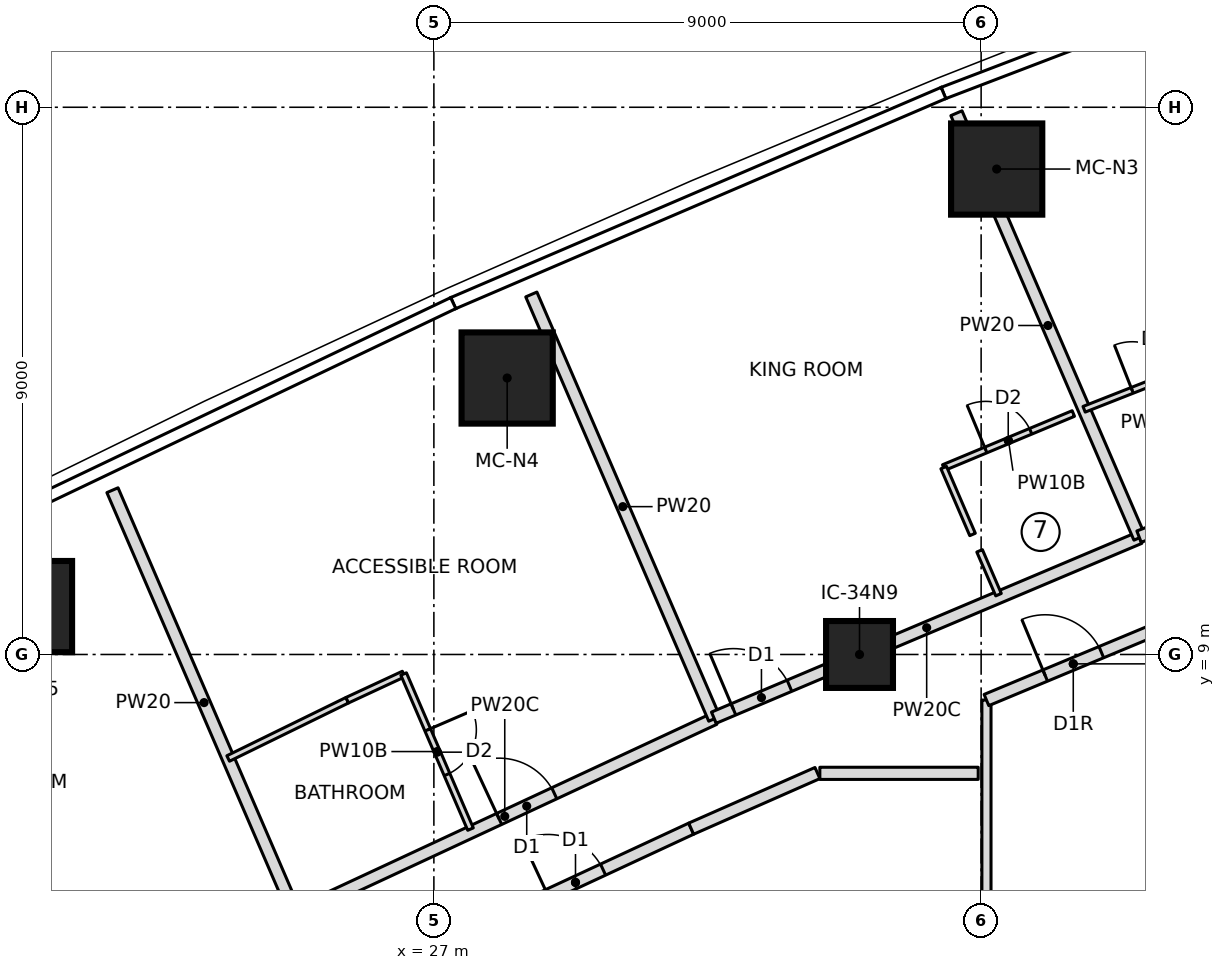
"""IFC4 building model, lengths in metres.
Left out: names, types, materials, properties, quantities, classifications, styles, units other than length and angle.
Written with IfcOpenShell. Run it as: python <this file> out.ifc"""

import sys

from ifc_helpers import new_model, si_unit, direction, frame, frame_2d, origin, origin_2d, place, context, subcontext, project, spatial, rectangle, extrude, element, fill, save


model = new_model("IFC4")
c1 = context("Model", 3, precision=1e-05, world=origin(), true_north=direction((0.0, 1.0)))
c2 = subcontext(c1, "Body", "Model", "MODEL_VIEW")
j1 = project(units=[si_unit("LENGTHUNIT", "METRE"), si_unit("PLANEANGLEUNIT", "RADIAN")], contexts=[c1])
p1 = place(None, origin())
s1 = spatial("IfcSite", under=j1, at=p1, CompositionType="ELEMENT")
p2 = place(p1, origin())
s2 = spatial("IfcBuilding", under=s1, at=p2, CompositionType="ELEMENT")
p3 = place(p2, frame((0.0, 0.0, 158.6)))
s3 = spatial("IfcBuildingStorey", under=s2, at=p3, CompositionType="ELEMENT", Elevation=158.6)
for number, where, z_axis, x_axis in (
    (1, (36.256, 16.984, 0.0), (0.0, 0.0, 1.0), (1.0, 0.0, 0.0)),
    (2, (28.205, 13.547, 0.0), (0.0, 0.0, 1.0), (1.0, 0.0, 0.0)),
    (3, (20.3, 9.788, 0.0), (0.0, 0.0, 1.0), (1.0, 0.0, 0.0)),
):
    element("IfcColumn", number, at=place(p3, frame(where, z_axis=z_axis, x_axis=x_axis)), inside=s3, PredefinedType="COLUMN", context=c2, shape_type="SweptSolid", body=[
        extrude(rectangle(XDim=1.5, YDim=1.5, at=origin_2d()), origin(), (0.0, 0.0, 1.0), 3.55),
    ])
p4 = place(p3, frame((34.0, 9.0, 0.0), z_axis=(0.0, 0.0, 1.0), x_axis=(1.0, 0.0, 0.0)))
e4 = element("IfcColumn", 4, at=p4, inside=s3, PredefinedType="COLUMN", context=c2, shape_type="SweptSolid", body=[
    extrude(rectangle(XDim=1.1, YDim=1.1, at=origin_2d()), origin(), (0.0, 0.0, 1.0), 3.55),
])
p5 = place(p3, frame((24.727, 4.715, 0.0), z_axis=(0.0, 0.0, 1.0), x_axis=(-0.395982367396, 0.918258114427, 0.0)))
e5 = element("IfcWall", 5, at=p5, inside=s3, PredefinedType="PARTITIONING", context=c2, shape_type="SweptSolid", body=[
    extrude(rectangle(XDim=7.609, YDim=0.2, at=frame_2d((3.804, 0.0))), origin(), (0.0, 0.0, 1.0), 3.25),
])
p6 = place(p3, frame((24.719, 4.733, 0.0), z_axis=(0.0, 0.0, 1.0), x_axis=(0.906593711122, 0.422004553238, 0.0)))
e6 = element("IfcWall", 6, at=p6, inside=s3, PredefinedType="PARTITIONING", context=c2, shape_type="SweptSolid", body=[
    extrude(rectangle(XDim=7.603, YDim=0.2, at=frame_2d((3.802, 0.0))), origin(), (0.0, 0.0, 1.0), 3.25),
])
p7 = place(p6, frame((3.7, 0.0, 0.0)))
e7 = element("IfcOpeningElement", 7, at=p7, cuts=e6, PredefinedType="OPENING", context=c2, shape_type="SweptSolid", body=[
    extrude(rectangle(XDim=1.0, YDim=2.1, at=frame_2d((0.5, 1.05))), frame((0.0, 0.11, 0.0), z_axis=(0.0, -1.0, 0.0), x_axis=(1.0, 0.0, 0.0)), (0.0, 0.0, 1.0), 0.22),
])
p8 = place(p3, frame((23.617, 7.289, 0.0), z_axis=(0.0, 0.0, 1.0), x_axis=(0.898158387811, 0.439672048696, 0.0)))
e8 = element("IfcWall", 8, at=p8, inside=s3, PredefinedType="PARTITIONING", context=c2, shape_type="SweptSolid", body=[
    extrude(rectangle(XDim=2.18, YDim=0.1, at=frame_2d((1.09, 0.0))), origin(), (0.0, 0.0, 1.0), 3.25),
])
p9 = place(p3, frame((25.575, 8.248, 0.0), z_axis=(0.0, 0.0, 1.0), x_axis=(0.906901476145, 0.421342749512, 0.0)))
e9 = element("IfcWall", 9, at=p9, inside=s3, PredefinedType="PARTITIONING", context=c2, shape_type="SweptSolid", body=[
    extrude(rectangle(XDim=1.023, YDim=0.1, at=frame_2d((0.511, 0.0))), origin(), (0.0, 0.0, 1.0), 3.25),
])
p10 = place(p3, frame((26.503, 8.679, 0.0), z_axis=(0.0, 0.0, 1.0), x_axis=(0.396018464604, -0.918242547311, 0.0)))
e10 = element("IfcWall", 10, at=p10, inside=s3, PredefinedType="PARTITIONING", context=c2, shape_type="SweptSolid", body=[
    extrude(rectangle(XDim=2.778, YDim=0.1, at=frame_2d((1.389, 0.0))), origin(), (0.0, 0.0, 1.0), 3.25),
])
p11 = place(p10, frame((1.0, 0.0, 0.0)))
e11 = element("IfcOpeningElement", 11, at=p11, cuts=e10, PredefinedType="OPENING", context=c2, shape_type="SweptSolid", body=[
    extrude(rectangle(XDim=0.8, YDim=2.1, at=frame_2d((0.4, 1.05))), frame((0.0, 0.06, 0.0), z_axis=(0.0, -1.0, 0.0), x_axis=(1.0, 0.0, 0.0)), (0.0, 0.0, 1.0), 0.12),
])
p12 = place(p3, frame((31.612, 7.942, 0.0), z_axis=(0.0, 0.0, 1.0), x_axis=(-0.395976934703, 0.91826045716, 0.0)))
e12 = element("IfcWall", 12, at=p12, inside=s3, PredefinedType="PARTITIONING", context=c2, shape_type="SweptSolid", body=[
    extrude(rectangle(XDim=7.6, YDim=0.2, at=frame_2d((3.8, 0.0))), origin(), (0.0, 0.0, 1.0), 3.25),
])
p13 = place(p3, frame((31.604, 7.96, 0.0), z_axis=(0.0, 0.0, 1.0), x_axis=(0.921069634751, 0.389397904386, 0.0)))
e13 = element("IfcWall", 13, at=p13, inside=s3, PredefinedType="PARTITIONING", context=c2, shape_type="SweptSolid", body=[
    extrude(rectangle(XDim=7.6, YDim=0.2, at=frame_2d((3.8, 0.0))), origin(), (0.0, 0.0, 1.0), 3.25),
])
p14 = place(p13, frame((0.35, 0.0, 0.0)))
e14 = element("IfcOpeningElement", 14, at=p14, cuts=e13, PredefinedType="OPENING", context=c2, shape_type="SweptSolid", body=[
    extrude(rectangle(XDim=1.0, YDim=2.1, at=frame_2d((0.5, 1.05))), frame((0.0, 0.11, 0.0), z_axis=(0.0, -1.0, 0.0), x_axis=(1.0, 0.0, 0.0)), (0.0, 0.0, 1.0), 0.22),
])
p15 = place(p3, frame((35.384, 12.074, 0.0), z_axis=(0.0, 0.0, 1.0), x_axis=(0.923014363649, 0.384765492863, 0.0)))
e15 = element("IfcWall", 15, at=p15, inside=s3, PredefinedType="PARTITIONING", context=c2, shape_type="SweptSolid", body=[
    extrude(rectangle(XDim=2.31, YDim=0.1, at=frame_2d((1.155, 0.0))), origin(), (0.0, 0.0, 1.0), 3.25),
])
p16 = place(p15, frame((0.75, 0.0, 0.0)))
e16 = element("IfcOpeningElement", 16, at=p16, cuts=e15, PredefinedType="OPENING", context=c2, shape_type="SweptSolid", body=[
    extrude(rectangle(XDim=0.8, YDim=2.1, at=frame_2d((0.4, 1.05))), frame((0.0, 0.06, 0.0), z_axis=(0.0, -1.0, 0.0), x_axis=(1.0, 0.0, 0.0)), (0.0, 0.0, 1.0), 0.12),
])
p17 = place(p3, frame((36.286, 9.983, 0.0), z_axis=(0.0, 0.0, 1.0), x_axis=(-0.396019167007, 0.918242244379, 0.0)))
e17 = element("IfcWall", 17, at=p17, inside=s3, PredefinedType="PARTITIONING", context=c2, shape_type="SweptSolid", body=[
    extrude(rectangle(XDim=0.785, YDim=0.1, at=frame_2d((0.393, 0.0))), origin(), (0.0, 0.0, 1.0), 3.25),
])
p18 = place(p3, frame((35.859, 10.974, 0.0), z_axis=(0.0, 0.0, 1.0), x_axis=(-0.396057430794, 0.918225741043, 0.0)))
e18 = element("IfcWall", 18, at=p18, inside=s3, PredefinedType="PARTITIONING", context=c2, shape_type="SweptSolid", body=[
    extrude(rectangle(XDim=1.198, YDim=0.1, at=frame_2d((0.599, 0.0))), origin(), (0.0, 0.0, 1.0), 3.25),
])
p19 = place(p3, frame((38.604, 10.92, 0.0), z_axis=(0.0, 0.0, 1.0), x_axis=(-0.395975928923, 0.918260890877, 0.0)))
e19 = element("IfcWall", 19, at=p19, inside=s3, PredefinedType="PARTITIONING", context=c2, shape_type="SweptSolid", body=[
    extrude(rectangle(XDim=7.604, YDim=0.2, at=frame_2d((3.802, 0.0))), origin(), (0.0, 0.0, 1.0), 3.25),
])
p20 = place(p3, frame((45.702, 13.655, 0.0), z_axis=(0.0, 0.0, 1.0), x_axis=(-0.934032939798, -0.35718688018, 0.0)))
e20 = element("IfcWall", 20, at=p20, inside=s3, PredefinedType="PARTITIONING", context=c2, shape_type="SweptSolid", body=[
    extrude(rectangle(XDim=7.607, YDim=0.2, at=frame_2d((3.803, 0.0))), origin(), (0.0, 0.0, 1.0), 3.25),
])
p21 = place(p20, frame((0.35, 0.0, 0.0)))
e21 = element("IfcOpeningElement", 21, at=p21, cuts=e20, PredefinedType="OPENING", context=c2, shape_type="SweptSolid", body=[
    extrude(rectangle(XDim=1.0, YDim=2.1, at=frame_2d((0.5, 1.05))), frame((0.0, 0.11, 0.0), z_axis=(0.0, -1.0, 0.0), x_axis=(1.0, 0.0, 0.0)), (0.0, 0.0, 1.0), 0.22),
])
p22 = place(p3, frame((37.693, 13.033, 0.0), z_axis=(0.0, 0.0, 1.0), x_axis=(0.930568677441, 0.366117380856, 0.0)))
e22 = element("IfcWall", 22, at=p22, inside=s3, PredefinedType="PARTITIONING", context=c2, shape_type="SweptSolid", body=[
    extrude(rectangle(XDim=2.501, YDim=0.1, at=frame_2d((1.25, 0.0))), origin(), (0.0, 0.0, 1.0), 3.25),
])
p23 = place(p22, frame((0.85, 0.0, 0.0)))
e23 = element("IfcOpeningElement", 23, at=p23, cuts=e22, PredefinedType="OPENING", context=c2, shape_type="SweptSolid", body=[
    extrude(rectangle(XDim=0.8, YDim=2.1, at=frame_2d((0.4, 1.05))), frame((0.0, 0.06, 0.0), z_axis=(0.0, -1.0, 0.0), x_axis=(1.0, 0.0, 0.0)), (0.0, 0.0, 1.0), 0.12),
])
p24 = place(p3, frame((27.427, 4.367, 0.0), z_axis=(0.0, 0.0, 1.0), x_axis=(0.906830275285, 0.421495968933, 0.0)))
e24 = element("IfcWall", 24, at=p24, inside=s3, PredefinedType="PARTITIONING", context=c2, shape_type="SweptSolid", body=[
    extrude(rectangle(XDim=4.195, YDim=0.2, at=frame_2d((2.098, 0.0))), origin(), (0.0, 0.0, 1.0), 3.25),
])
p25 = place(p24, frame((1.598, 0.0, 0.0)))
e25 = element("IfcOpeningElement", 25, at=p25, cuts=e24, PredefinedType="OPENING", context=c2, shape_type="SweptSolid", body=[
    extrude(rectangle(XDim=1.0, YDim=2.1, at=frame_2d((0.5, 1.05))), frame((0.0, 0.11, 0.0), z_axis=(0.0, -1.0, 0.0), x_axis=(1.0, 0.0, 0.0)), (0.0, 0.0, 1.0), 0.22),
])
p26 = place(p3, frame((31.231, 6.135, 0.0), z_axis=(0.0, 0.0, 1.0), x_axis=(0.915102334452, 0.403221672881, 0.0)))
e26 = element("IfcWall", 26, at=p26, inside=s3, PredefinedType="PARTITIONING", context=c2, shape_type="SweptSolid", body=[
    extrude(rectangle(XDim=2.269, YDim=0.2, at=frame_2d((1.135, 0.0))), origin(), (0.0, 0.0, 1.0), 3.25),
])
p27 = place(p3, frame((36.087, -8.25, 0.0), z_axis=(0.0, 0.0, 1.0), x_axis=(0.0, 1.0, 0.0)))
e27 = element("IfcWall", 27, at=p27, inside=s3, PredefinedType="PARTITIONING", context=c2, shape_type="SweptSolid", body=[
    extrude(rectangle(XDim=16.501, YDim=0.15, at=frame_2d((8.25, 0.0))), origin(), (0.0, 0.0, 1.0), 3.25),
])
p28 = place(p3, frame((36.087, 8.25, 0.0), z_axis=(0.0, 0.0, 1.0), x_axis=(0.923013875818, 0.384766663118, 0.0)))
e28 = element("IfcWall", 28, at=p28, inside=s3, PredefinedType="PARTITIONING", context=c2, shape_type="SweptSolid", body=[
    extrude(rectangle(XDim=3.094, YDim=0.2, at=frame_2d((1.547, 0.0))), origin(), (0.0, 0.0, 1.0), 3.25),
])
p29 = place(p28, frame((1.047, 0.0, 0.0)))
e29 = element("IfcOpeningElement", 29, at=p29, cuts=e28, PredefinedType="OPENING", context=c2, shape_type="SweptSolid", body=[
    extrude(rectangle(XDim=1.0, YDim=2.1, at=frame_2d((0.5, 1.05))), frame((0.0, 0.11, 0.0), z_axis=(0.0, -1.0, 0.0), x_axis=(1.0, 0.0, 0.0)), (0.0, 0.0, 1.0), 0.22),
])
p30 = place(p3, frame((33.347, 7.045, 0.0), z_axis=(0.0, 0.0, 1.0), x_axis=(0.999999982426, 0.000187476562, 0.0)))
e30 = element("IfcWall", 30, at=p30, inside=s3, PredefinedType="PARTITIONING", context=c2, shape_type="SweptSolid", body=[
    extrude(rectangle(XDim=2.604, YDim=0.2, at=frame_2d((1.302, 0.0))), origin(), (0.0, 0.0, 1.0), 3.25),
])
p31 = place(p11, origin())
e31 = element("IfcDoor", 31, at=p31, inside=s3, OperationType="SINGLE_SWING_LEFT", PredefinedType="DOOR", context=c2, shape_type="SweptSolid", body=[
    extrude(rectangle(XDim=0.8, YDim=2.1, at=frame_2d((0.4, 1.05))), frame((0.0, 0.025, 0.0), z_axis=(0.0, -1.0, 0.0), x_axis=(1.0, 0.0, 0.0)), (0.0, 0.0, 1.0), 0.05),
])
fill(e11, e31)
p32 = place(p7, origin())
e32 = element("IfcDoor", 32, at=p32, inside=s3, OperationType="SINGLE_SWING_LEFT", PredefinedType="DOOR", context=c2, shape_type="SweptSolid", body=[
    extrude(rectangle(XDim=1.0, YDim=2.1, at=frame_2d((0.5, 1.05))), frame((0.0, 0.025, 0.0), z_axis=(0.0, -1.0, 0.0), x_axis=(1.0, 0.0, 0.0)), (0.0, 0.0, 1.0), 0.05),
])
fill(e7, e32)
p33 = place(p16, origin())
e33 = element("IfcDoor", 33, at=p33, inside=s3, OperationType="SINGLE_SWING_LEFT", PredefinedType="DOOR", context=c2, shape_type="SweptSolid", body=[
    extrude(rectangle(XDim=0.8, YDim=2.1, at=frame_2d((0.4, 1.05))), frame((0.0, 0.025, 0.0), z_axis=(0.0, -1.0, 0.0), x_axis=(1.0, 0.0, 0.0)), (0.0, 0.0, 1.0), 0.05),
])
fill(e16, e33)
p34 = place(p14, origin())
e34 = element("IfcDoor", 34, at=p34, inside=s3, OperationType="SINGLE_SWING_LEFT", PredefinedType="DOOR", context=c2, shape_type="SweptSolid", body=[
    extrude(rectangle(XDim=1.0, YDim=2.1, at=frame_2d((0.5, 1.05))), frame((0.0, 0.025, 0.0), z_axis=(0.0, -1.0, 0.0), x_axis=(1.0, 0.0, 0.0)), (0.0, 0.0, 1.0), 0.05),
])
fill(e14, e34)
p35 = place(p23, origin())
e35 = element("IfcDoor", 35, at=p35, inside=s3, OperationType="SINGLE_SWING_LEFT", PredefinedType="DOOR", context=c2, shape_type="SweptSolid", body=[
    extrude(rectangle(XDim=0.8, YDim=2.1, at=frame_2d((0.4, 1.05))), frame((0.0, 0.025, 0.0), z_axis=(0.0, -1.0, 0.0), x_axis=(1.0, 0.0, 0.0)), (0.0, 0.0, 1.0), 0.05),
])
fill(e23, e35)
p36 = place(p25, origin())
e36 = element("IfcDoor", 36, at=p36, inside=s3, OperationType="SINGLE_SWING_LEFT", PredefinedType="DOOR", context=c2, shape_type="SweptSolid", body=[
    extrude(rectangle(XDim=1.0, YDim=2.1, at=frame_2d((0.5, 1.05))), frame((0.0, 0.025, 0.0), z_axis=(0.0, -1.0, 0.0), x_axis=(1.0, 0.0, 0.0)), (0.0, 0.0, 1.0), 0.05),
])
fill(e25, e36)
p37 = place(p29, origin())
e37 = element("IfcDoor", 37, at=p37, inside=s3, OperationType="SINGLE_SWING_RIGHT", PredefinedType="DOOR", context=c2, shape_type="SweptSolid", body=[
    extrude(rectangle(XDim=1.0, YDim=2.1, at=frame_2d((0.5, 1.05))), frame((0.0, 0.025, 0.0), z_axis=(0.0, -1.0, 0.0), x_axis=(1.0, 0.0, 0.0)), (0.0, 0.0, 1.0), 0.05),
])
fill(e29, e37)
save(model, sys.argv[1])
